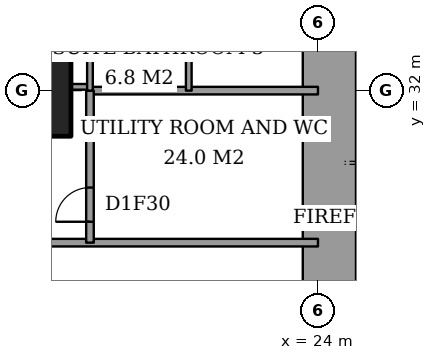
"""IFC4 building model, lengths in metres.
Left out: names, types, materials, properties, quantities, classifications, styles, units other than length and angle.
Written with IfcOpenShell. Run it as: python <this file> out.ifc"""

import sys

from ifc_helpers import new_model, si_unit, direction, frame, frame_2d, origin, origin_2d, place, context, subcontext, project, spatial, rectangle, extrude, element, fill, save


model = new_model("IFC4")
c1 = context("Model", 3, precision=1e-05, world=origin(), true_north=direction((0.0, 1.0)))
c2 = subcontext(c1, "Body", "Model", "MODEL_VIEW")
j1 = project(units=[si_unit("LENGTHUNIT", "METRE"), si_unit("PLANEANGLEUNIT", "RADIAN")], contexts=[c1])
p1 = place(None, origin())
s1 = spatial("IfcSite", under=j1, at=p1, CompositionType="ELEMENT")
p2 = place(p1, origin())
s2 = spatial("IfcBuilding", under=s1, at=p2, CompositionType="ELEMENT")
p3 = place(p2, frame((0.0, 0.0, 153.8)))
s3 = spatial("IfcBuildingStorey", under=s2, at=p3, CompositionType="ELEMENT", Elevation=153.8)
p4 = place(p3, frame((16.0, 32.0, 0.0), z_axis=(0.0, 0.0, 1.0), x_axis=(1.0, 0.0, 0.0)))
e1 = element("IfcColumn", 1, at=p4, inside=s3, PredefinedType="COLUMN", context=c2, shape_type="SweptSolid", body=[
    extrude(rectangle(XDim=3.0, YDim=2.4, at=origin_2d()), origin(), (0.0, 0.0, 1.0), 3.6),
])
p5 = place(p3, frame((24.3, 23.15, 0.0), z_axis=(0.0, 0.0, 1.0), x_axis=(0.0, 1.0, 0.0)))
e2 = element("IfcWall", 2, at=p5, inside=s3, PredefinedType="SHEAR", context=c2, shape_type="SweptSolid", body=[
    extrude(rectangle(XDim=11.85, YDim=1.4, at=frame_2d((5.925, 0.0))), origin(), (0.0, 0.0, 1.0), 3.6),
])
p6 = place(p5, frame((0.75, 0.0, 0.0)))
e3 = element("IfcOpeningElement", 3, at=p6, cuts=e2, PredefinedType="OPENING", context=c2, shape_type="SweptSolid", body=[
    extrude(rectangle(XDim=1.8, YDim=2.4, at=frame_2d((0.9, 1.2))), frame((0.0, 0.71, 0.0), z_axis=(0.0, -1.0, 0.0), x_axis=(1.0, 0.0, 0.0)), (0.0, 0.0, 1.0), 1.42),
])
p7 = place(p3, frame((6.725, 28.0, 0.0), z_axis=(0.0, 0.0, 1.0), x_axis=(1.0, 0.0, 0.0)))
e4 = element("IfcWall", 4, at=p7, inside=s3, PredefinedType="PARTITIONING", context=c2, shape_type="SweptSolid", body=[
    extrude(rectangle(XDim=17.275, YDim=0.2, at=frame_2d((8.637, 0.0))), origin(), (0.0, 0.0, 1.0), 3.35),
])
p8 = place(p7, frame((6.675, 0.0, 0.0)))
e5 = element("IfcOpeningElement", 5, at=p8, cuts=e4, PredefinedType="OPENING", context=c2, shape_type="SweptSolid", body=[
    extrude(rectangle(XDim=1.2, YDim=2.4, at=frame_2d((0.6, 1.2))), frame((0.0, 0.11, 0.0), z_axis=(0.0, -1.0, 0.0), x_axis=(1.0, 0.0, 0.0)), (0.0, 0.0, 1.0), 0.22),
])
p9 = place(p3, frame((18.0, 32.0, 0.0), z_axis=(0.0, 0.0, 1.0), x_axis=(1.0, 0.0, 0.0)))
e6 = element("IfcWall", 6, at=p9, inside=s3, PredefinedType="PARTITIONING", context=c2, shape_type="SweptSolid", body=[
    extrude(rectangle(XDim=6.0, YDim=0.2, at=frame_2d((3.0, 0.0))), origin(), (0.0, 0.0, 1.0), 2.634),
])
p10 = place(p3, frame((17.5, 32.1, 0.0), z_axis=(0.0, 0.0, 1.0), x_axis=(1.0, 0.0, 0.0)))
e7 = element("IfcWall", 7, at=p10, inside=s3, PredefinedType="PARTITIONING", context=c2, shape_type="SweptSolid", body=[
    extrude(rectangle(XDim=0.5, YDim=0.15, at=frame_2d((0.25, 0.0))), origin(), (0.0, 0.0, 1.0), 2.634),
])
p11 = place(p3, frame((18.0, 28.0, 0.0), z_axis=(0.0, 0.0, 1.0), x_axis=(0.0, 1.0, 0.0)))
e8 = element("IfcWall", 8, at=p11, inside=s3, PredefinedType="PARTITIONING", context=c2, shape_type="SweptSolid", body=[
    extrude(rectangle(XDim=4.0, YDim=0.2, at=frame_2d((2.0, 0.0))), origin(), (0.0, 0.0, 1.0), 3.35),
])
p12 = place(p11, frame((0.55, 0.0, 0.0)))
e9 = element("IfcOpeningElement", 9, at=p12, cuts=e8, PredefinedType="OPENING", context=c2, shape_type="SweptSolid", body=[
    extrude(rectangle(XDim=0.9, YDim=2.1, at=frame_2d((0.45, 1.05))), frame((0.0, 0.11, 0.0), z_axis=(0.0, -1.0, 0.0), x_axis=(1.0, 0.0, 0.0)), (0.0, 0.0, 1.0), 0.22),
])
p13 = place(p3, frame((18.0, 32.0, 0.0), z_axis=(0.0, 0.0, 1.0), x_axis=(0.0, 1.0, 0.0)))
e10 = element("IfcWall", 10, at=p13, inside=s3, PredefinedType="PARTITIONING", context=c2, shape_type="SweptSolid", body=[
    extrude(rectangle(XDim=5.4, YDim=0.15, at=frame_2d((2.7, 0.0))), origin(), (0.0, 0.0, 1.0), 3.35),
])
p14 = place(p3, frame((20.6, 32.0, 0.0), z_axis=(0.0, 0.0, 1.0), x_axis=(0.0, 1.0, 0.0)))
e11 = element("IfcWall", 11, at=p14, inside=s3, PredefinedType="PARTITIONING", context=c2, shape_type="SweptSolid", body=[
    extrude(rectangle(XDim=2.6, YDim=0.15, at=frame_2d((1.3, 0.0))), origin(), (0.0, 0.0, 1.0), 3.35),
])
p15 = place(p12, origin())
e12 = element("IfcDoor", 12, at=p15, inside=s3, OperationType="SINGLE_SWING_RIGHT", PredefinedType="DOOR", context=c2, shape_type="SweptSolid", body=[
    extrude(rectangle(XDim=0.9, YDim=2.1, at=frame_2d((0.45, 1.05))), frame((0.0, 0.025, 0.0), z_axis=(0.0, -1.0, 0.0), x_axis=(1.0, 0.0, 0.0)), (0.0, 0.0, 1.0), 0.05),
])
fill(e9, e12)
save(model, sys.argv[1])
